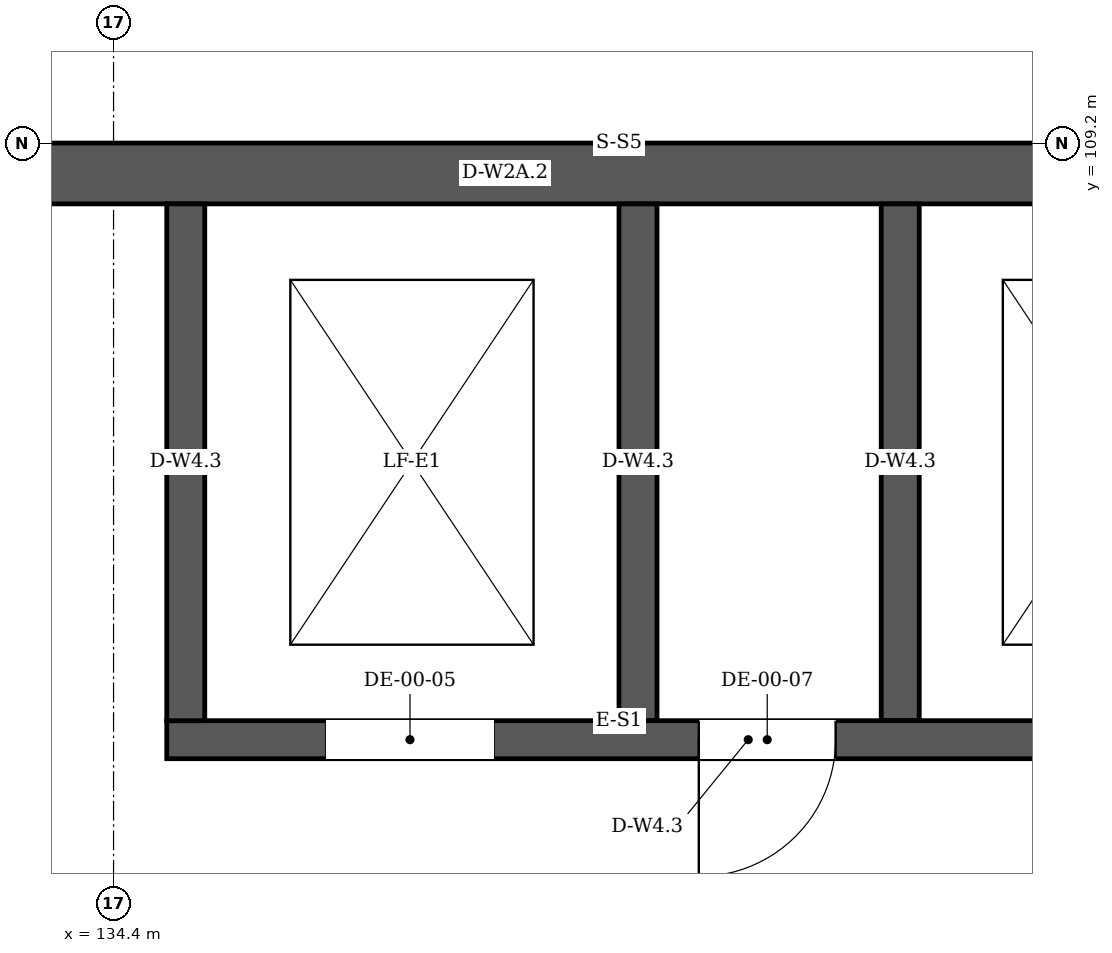
"""IFC4 building model, lengths in metres.
Left out: names, types, materials, properties, quantities, classifications, styles, units other than length and angle.
Written with IfcOpenShell. Run it as: python <this file> out.ifc"""

import sys

from ifc_helpers import new_model, si_unit, direction, frame, frame_2d, origin, place, context, subcontext, project, spatial, rectangle, extrude, element, fill, save


model = new_model("IFC4")
c1 = context("Model", 3, precision=1e-05, world=origin(), true_north=direction((0.0, 1.0)))
c2 = subcontext(c1, "Body", "Model", "MODEL_VIEW")
j1 = project(units=[si_unit("LENGTHUNIT", "METRE"), si_unit("PLANEANGLEUNIT", "RADIAN")], contexts=[c1])
p1 = place(None, origin())
s1 = spatial("IfcSite", under=j1, at=p1, CompositionType="ELEMENT")
p2 = place(p1, origin())
s2 = spatial("IfcBuilding", under=s1, at=p2, CompositionType="ELEMENT")
p3 = place(p2, origin())
s3 = spatial("IfcBuildingStorey", under=s2, at=p3, CompositionType="ELEMENT", Elevation=0.0)
p4 = place(p3, frame((126.0, 109.0, 0.0), z_axis=(0.0, 0.0, 1.0), x_axis=(1.0, 0.0, 0.0)))
e1 = element("IfcWall", 1, at=p4, inside=s3, PredefinedType="SOLIDWALL", context=c2, shape_type="SweptSolid", body=[
    extrude(rectangle(XDim=16.8, YDim=0.4, at=frame_2d((8.4, 0.0))), origin(), (0.0, 0.0, 1.0), 5.72),
])
p5 = place(p3, frame((134.75, 105.275, -1.4), z_axis=(0.0, 0.0, 1.0), x_axis=(1.0, 0.0, 0.0)))
e2 = element("IfcWall", 2, at=p5, inside=s3, PredefinedType="SOLIDWALL", context=c2, shape_type="SweptSolid", body=[
    extrude(rectangle(XDim=7.65, YDim=0.25, at=frame_2d((3.825, 0.0))), origin(), (0.0, 0.0, 1.0), 7.12),
])
p6 = place(p5, frame((1.05, 0.0, 1.4)))
e3 = element("IfcOpeningElement", 3, at=p6, cuts=e2, PredefinedType="OPENING", context=c2, shape_type="SweptSolid", body=[
    extrude(rectangle(XDim=1.1, YDim=2.1, at=frame_2d((0.55, 1.05))), frame((0.0, 0.135, 0.0), z_axis=(0.0, -1.0, 0.0), x_axis=(1.0, 0.0, 0.0)), (0.0, 0.0, 1.0), 0.27),
])
p7 = place(p5, frame((5.75, 0.0, 1.4)))
e4 = element("IfcOpeningElement", 4, at=p7, cuts=e2, PredefinedType="OPENING", context=c2, shape_type="SweptSolid", body=[
    extrude(rectangle(XDim=1.1, YDim=2.1, at=frame_2d((0.55, 1.05))), frame((0.0, 0.135, 0.0), z_axis=(0.0, -1.0, 0.0), x_axis=(1.0, 0.0, 0.0)), (0.0, 0.0, 1.0), 0.27),
])
p8 = place(p5, frame((3.5, 0.0, 1.4)))
e5 = element("IfcOpeningElement", 5, at=p8, cuts=e2, PredefinedType="OPENING", context=c2, shape_type="SweptSolid", body=[
    extrude(rectangle(XDim=0.9, YDim=2.1, at=frame_2d((0.45, 1.05))), frame((0.0, 0.135, 0.0), z_axis=(0.0, -1.0, 0.0), x_axis=(1.0, 0.0, 0.0)), (0.0, 0.0, 1.0), 0.27),
])
for number, where, z_axis, x_axis in (
    (6, (134.875, 105.4, -1.4), (0.0, 0.0, 1.0), (0.0, 1.0, 0.0)),
    (7, (137.85, 105.4, -1.4), (0.0, 0.0, 1.0), (0.0, 1.0, 0.0)),
    (8, (139.575, 105.4, -1.4), (0.0, 0.0, 1.0), (0.0, 1.0, 0.0)),
):
    element("IfcWall", number, at=place(p3, frame(where, z_axis=z_axis, x_axis=x_axis)), inside=s3, PredefinedType="SOLIDWALL", context=c2, shape_type="SweptSolid", body=[
        extrude(rectangle(XDim=3.4, YDim=0.25, at=frame_2d((1.7, 0.0))), origin(), (0.0, 0.0, 1.0), 7.12),
    ])
p9 = place(p6, origin())
e9 = element("IfcDoor", 9, at=p9, inside=s3, OperationType="DOUBLE_DOOR_SLIDING", PredefinedType="DOOR", context=c2, shape_type="SweptSolid", body=[
    extrude(rectangle(XDim=1.1, YDim=2.1, at=frame_2d((0.55, 1.05))), frame((0.0, 0.025, 0.0), z_axis=(0.0, -1.0, 0.0), x_axis=(1.0, 0.0, 0.0)), (0.0, 0.0, 1.0), 0.05),
])
fill(e3, e9)
p10 = place(p8, origin())
e10 = element("IfcDoor", 10, at=p10, inside=s3, OperationType="SINGLE_SWING_LEFT", PredefinedType="DOOR", context=c2, shape_type="SweptSolid", body=[
    extrude(rectangle(XDim=0.9, YDim=2.1, at=frame_2d((0.45, 1.05))), frame((0.0, 0.025, 0.0), z_axis=(0.0, -1.0, 0.0), x_axis=(1.0, 0.0, 0.0)), (0.0, 0.0, 1.0), 0.05),
])
fill(e5, e10)
save(model, sys.argv[1])
